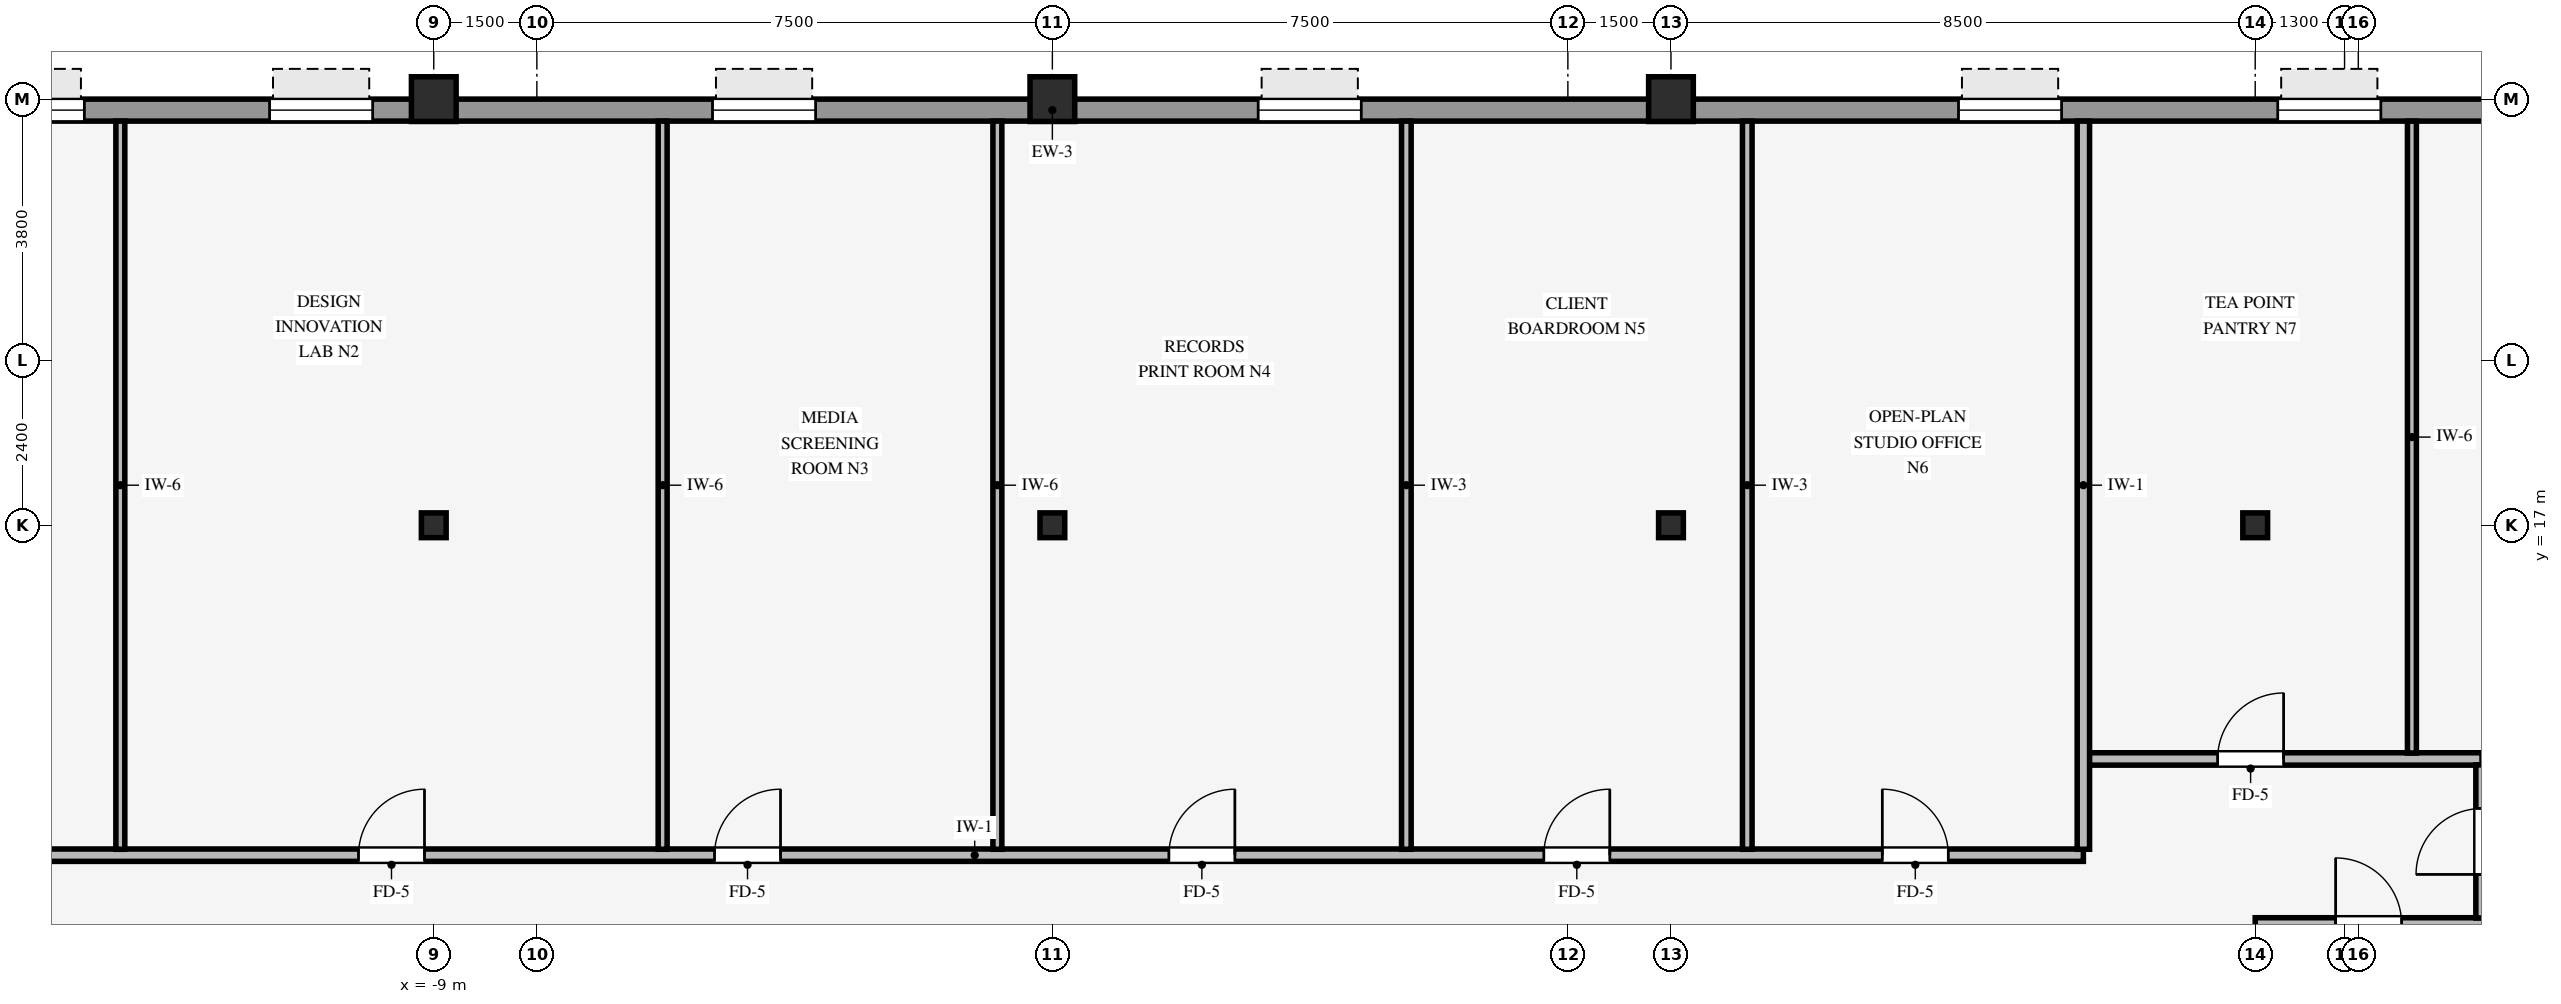
"""IFC4 building model, lengths in metres.
Left out: names, types, materials, properties, quantities, classifications, styles, units other than length and angle.
Written with IfcOpenShell. Run it as: python <this file> out.ifc"""

import sys

from ifc_helpers import new_model, si_unit, direction, frame, frame_2d, origin, origin_2d, place, context, subcontext, project, spatial, rectangle, hollow_rectangle, i_section, extrude, source, transform, mapped, element, fill, save


model = new_model("IFC4")
c1 = context("Model", 3, precision=1e-05, world=origin(), true_north=direction((0.0, 1.0)))
c2 = subcontext(c1, "Body", "Model", "MODEL_VIEW")
j1 = project(units=[si_unit("LENGTHUNIT", "METRE"), si_unit("PLANEANGLEUNIT", "RADIAN")], contexts=[c1])
p1 = place(None, origin())
s1 = spatial("IfcSite", under=j1, at=p1, CompositionType="ELEMENT")
p2 = place(p1, origin())
s2 = spatial("IfcBuilding", under=s1, at=p2, CompositionType="ELEMENT")
p3 = place(p2, frame((0.0, 0.0, 109.25)))
s3 = spatial("IfcBuildingStorey", under=s2, at=p3, CompositionType="ELEMENT", Elevation=109.25)
for number, where, z_axis, x_axis in (
    (1, (-9.0, 23.2, 0.0), (0.0, 0.0, 1.0), (1.0, 0.0, 0.0)),
    (2, (0.0, 23.2, 0.0), (0.0, 0.0, 1.0), (1.0, 0.0, 0.0)),
    (3, (9.0, 23.2, 0.0), (0.0, 0.0, 1.0), (1.0, 0.0, 0.0)),
):
    element("IfcColumn", number, at=place(p3, frame(where, z_axis=z_axis, x_axis=x_axis)), inside=s3, PredefinedType="COLUMN", context=c2, shape_type="SweptSolid", body=[
        extrude(hollow_rectangle(XDim=0.65, YDim=0.65, WallThickness=0.04, InnerFilletRadius=0.04, OuterFilletRadius=0.08, at=origin_2d()), origin(), (0.0, 0.0, 1.0), 3.37),
    ])
for number, where, z_axis, x_axis in (
    (4, (0.0, 17.0, 0.0), (0.0, 0.0, 1.0), (1.0, 0.0, 0.0)),
    (5, (-9.0, 17.0, 0.0), (0.0, 0.0, 1.0), (1.0, 0.0, 0.0)),
    (6, (9.0, 17.0, 0.0), (0.0, 0.0, 1.0), (1.0, 0.0, 0.0)),
    (7, (17.5, 17.0, 0.0), (0.0, 0.0, 1.0), (1.0, 0.0, 0.0)),
):
    element("IfcColumn", number, at=place(p3, frame(where, z_axis=z_axis, x_axis=x_axis)), inside=s3, PredefinedType="COLUMN", context=c2, shape_type="SweptSolid", body=[
        extrude(i_section(OverallWidth=0.36, OverallDepth=0.36, WebThickness=0.021, FlangeThickness=0.021, FilletRadius=0.018, at=origin_2d()), origin(), (0.0, 0.0, 1.0), 3.37),
    ])
p4 = place(p3, frame((-21.9, 23.04, 0.0), z_axis=(0.0, 0.0, 1.0), x_axis=(1.0, 0.0, 0.0)))
e8 = element("IfcWall", 8, at=p4, inside=s3, PredefinedType="STANDARD", context=c2, shape_type="SweptSolid", body=[
    extrude(rectangle(XDim=43.8, YDim=0.32, at=frame_2d((21.9, 0.0))), origin(), (0.0, 0.0, 1.0), 2.705),
])
p5 = place(p4, frame((2.572, 0.0, 0.8)))
e9 = element("IfcOpeningElement", 9, at=p5, cuts=e8, PredefinedType="OPENING", context=c2, shape_type="SweptSolid", body=[
    extrude(rectangle(XDim=1.5, YDim=1.6, at=frame_2d((0.75, 0.8))), frame((0.0, 0.17, 0.0), z_axis=(0.0, -1.0, 0.0), x_axis=(1.0, 0.0, 0.0)), (0.0, 0.0, 1.0), 0.34),
])
p6 = place(p4, frame((6.317, 0.0, 0.8)))
e10 = element("IfcOpeningElement", 10, at=p6, cuts=e8, PredefinedType="OPENING", context=c2, shape_type="SweptSolid", body=[
    extrude(rectangle(XDim=1.5, YDim=1.6, at=frame_2d((0.75, 0.8))), frame((0.0, 0.17, 0.0), z_axis=(0.0, -1.0, 0.0), x_axis=(1.0, 0.0, 0.0)), (0.0, 0.0, 1.0), 0.34),
])
p7 = place(p4, frame((10.511, 0.0, 0.8)))
e11 = element("IfcOpeningElement", 11, at=p7, cuts=e8, PredefinedType="OPENING", context=c2, shape_type="SweptSolid", body=[
    extrude(rectangle(XDim=1.5, YDim=1.6, at=frame_2d((0.75, 0.8))), frame((0.0, 0.17, 0.0), z_axis=(0.0, -1.0, 0.0), x_axis=(1.0, 0.0, 0.0)), (0.0, 0.0, 1.0), 0.34),
])
p8 = place(p4, frame((16.956, 0.0, 0.8)))
e12 = element("IfcOpeningElement", 12, at=p8, cuts=e8, PredefinedType="OPENING", context=c2, shape_type="SweptSolid", body=[
    extrude(rectangle(XDim=1.5, YDim=1.6, at=frame_2d((0.75, 0.8))), frame((0.0, 0.17, 0.0), z_axis=(0.0, -1.0, 0.0), x_axis=(1.0, 0.0, 0.0)), (0.0, 0.0, 1.0), 0.34),
])
p9 = place(p4, frame((24.894, 0.0, 0.8)))
e13 = element("IfcOpeningElement", 13, at=p9, cuts=e8, PredefinedType="OPENING", context=c2, shape_type="SweptSolid", body=[
    extrude(rectangle(XDim=1.5, YDim=1.6, at=frame_2d((0.75, 0.8))), frame((0.0, 0.17, 0.0), z_axis=(0.0, -1.0, 0.0), x_axis=(1.0, 0.0, 0.0)), (0.0, 0.0, 1.0), 0.34),
])
p10 = place(p4, frame((35.083, 0.0, 0.8)))
e14 = element("IfcOpeningElement", 14, at=p10, cuts=e8, PredefinedType="OPENING", context=c2, shape_type="SweptSolid", body=[
    extrude(rectangle(XDim=1.5, YDim=1.6, at=frame_2d((0.75, 0.8))), frame((0.0, 0.17, 0.0), z_axis=(0.0, -1.0, 0.0), x_axis=(1.0, 0.0, 0.0)), (0.0, 0.0, 1.0), 0.34),
])
p11 = place(p4, frame((39.728, 0.0, 0.8)))
e15 = element("IfcOpeningElement", 15, at=p11, cuts=e8, PredefinedType="OPENING", context=c2, shape_type="SweptSolid", body=[
    extrude(rectangle(XDim=1.5, YDim=1.6, at=frame_2d((0.75, 0.8))), frame((0.0, 0.17, 0.0), z_axis=(0.0, -1.0, 0.0), x_axis=(1.0, 0.0, 0.0)), (0.0, 0.0, 1.0), 0.34),
])
p12 = place(p3, frame((17.5, 11.2, 0.0), z_axis=(0.0, 0.0, 1.0), x_axis=(1.0, 0.0, 0.0)))
e16 = element("IfcWall", 16, at=p12, inside=s3, PredefinedType="PARTITIONING", context=c2, shape_type="SweptSolid", body=[
    extrude(rectangle(XDim=6.18, YDim=0.18, at=frame_2d((3.09, 0.0))), origin(), (0.0, 0.0, 1.0), 3.36),
])
p13 = place(p12, frame((1.17, 0.0, 0.0)))
e17 = element("IfcOpeningElement", 17, at=p13, cuts=e16, PredefinedType="OPENING", context=c2, shape_type="SweptSolid", body=[
    extrude(rectangle(XDim=0.96, YDim=2.1, at=frame_2d((0.48, 1.05))), frame((0.0, 0.1, 0.0), z_axis=(0.0, -1.0, 0.0), x_axis=(1.0, 0.0, 0.0)), (0.0, 0.0, 1.0), 0.2),
])
p14 = place(p3, frame((-15.0, 12.2, 0.0), z_axis=(0.0, 0.0, 1.0), x_axis=(1.0, 0.0, 0.0)))
e18 = element("IfcWall", 18, at=p14, inside=s3, PredefinedType="PARTITIONING", context=c2, shape_type="SweptSolid", body=[
    extrude(rectangle(XDim=30.0, YDim=0.18, at=frame_2d((15.0, 0.0))), origin(), (0.0, 0.0, 1.0), 3.36),
])
p15 = place(p14, frame((4.905, 0.0, 0.0)))
e19 = element("IfcOpeningElement", 19, at=p15, cuts=e18, PredefinedType="OPENING", context=c2, shape_type="SweptSolid", body=[
    extrude(rectangle(XDim=0.96, YDim=2.1, at=frame_2d((0.48, 1.05))), frame((0.0, 0.1, 0.0), z_axis=(0.0, -1.0, 0.0), x_axis=(1.0, 0.0, 0.0)), (0.0, 0.0, 1.0), 0.2),
])
p16 = place(p14, frame((16.695, 0.0, 0.0)))
e20 = element("IfcOpeningElement", 20, at=p16, cuts=e18, PredefinedType="OPENING", context=c2, shape_type="SweptSolid", body=[
    extrude(rectangle(XDim=0.96, YDim=2.1, at=frame_2d((0.48, 1.05))), frame((0.0, 0.1, 0.0), z_axis=(0.0, -1.0, 0.0), x_axis=(1.0, 0.0, 0.0)), (0.0, 0.0, 1.0), 0.2),
])
p17 = place(p14, frame((22.15, 0.0, 0.0)))
e21 = element("IfcOpeningElement", 21, at=p17, cuts=e18, PredefinedType="OPENING", context=c2, shape_type="SweptSolid", body=[
    extrude(rectangle(XDim=0.96, YDim=2.1, at=frame_2d((0.48, 1.05))), frame((0.0, 0.1, 0.0), z_axis=(0.0, -1.0, 0.0), x_axis=(1.0, 0.0, 0.0)), (0.0, 0.0, 1.0), 0.2),
])
p18 = place(p14, frame((27.075, 0.0, 0.0)))
e22 = element("IfcOpeningElement", 22, at=p18, cuts=e18, PredefinedType="OPENING", context=c2, shape_type="SweptSolid", body=[
    extrude(rectangle(XDim=0.96, YDim=2.1, at=frame_2d((0.48, 1.05))), frame((0.0, 0.1, 0.0), z_axis=(0.0, -1.0, 0.0), x_axis=(1.0, 0.0, 0.0)), (0.0, 0.0, 1.0), 0.2),
])
p19 = place(p14, frame((10.085, 0.0, 0.0)))
e23 = element("IfcOpeningElement", 23, at=p19, cuts=e18, PredefinedType="OPENING", context=c2, shape_type="SweptSolid", body=[
    extrude(rectangle(XDim=0.96, YDim=2.1, at=frame_2d((0.48, 1.05))), frame((0.0, 0.1, 0.0), z_axis=(0.0, -1.0, 0.0), x_axis=(1.0, 0.0, 0.0)), (0.0, 0.0, 1.0), 0.2),
])
p20 = place(p3, frame((15.086, 13.6, 0.0), z_axis=(0.0, 0.0, 1.0), x_axis=(1.0, 0.0, 0.0)))
e24 = element("IfcWall", 24, at=p20, inside=s3, PredefinedType="PARTITIONING", context=c2, shape_type="SweptSolid", body=[
    extrude(rectangle(XDim=5.714, YDim=0.18, at=frame_2d((2.857, 0.0))), origin(), (0.0, 0.0, 1.0), 2.998),
])
p21 = place(p20, frame((1.867, 0.0, 0.0)))
e25 = element("IfcOpeningElement", 25, at=p21, cuts=e24, PredefinedType="OPENING", context=c2, shape_type="SweptSolid", body=[
    extrude(rectangle(XDim=0.96, YDim=2.1, at=frame_2d((0.48, 1.05))), frame((0.0, 0.1, 0.0), z_axis=(0.0, -1.0, 0.0), x_axis=(1.0, 0.0, 0.0)), (0.0, 0.0, 1.0), 0.2),
])
for number, where, z_axis, x_axis in (
    (26, (-13.56, 12.286, 0.0), (0.0, 0.0, 1.0), (0.0, 1.0, 0.0)),
    (27, (-5.67, 12.286, 0.0), (0.0, 0.0, 1.0), (0.0, 1.0, 0.0)),
    (28, (-0.8, 12.286, 0.0), (0.0, 0.0, 1.0), (0.0, 1.0, 0.0)),
):
    element("IfcWall", number, at=place(p3, frame(where, z_axis=z_axis, x_axis=x_axis)), inside=s3, PredefinedType="PARTITIONING", context=c2, shape_type="SweptSolid", body=[
        extrude(rectangle(XDim=10.594, YDim=0.13, at=frame_2d((5.297, 0.0))), origin(), (0.0, 0.0, 1.0), 3.36),
    ])
for number, where, z_axis, x_axis in (
    (29, (5.15, 12.286, 0.0), (0.0, 0.0, 1.0), (0.0, 1.0, 0.0)),
    (30, (10.11, 12.286, 0.0), (0.0, 0.0, 1.0), (0.0, 1.0, 0.0)),
):
    element("IfcWall", number, at=place(p3, frame(where, z_axis=z_axis, x_axis=x_axis)), inside=s3, PredefinedType="PARTITIONING", context=c2, shape_type="SweptSolid", body=[
        extrude(rectangle(XDim=10.594, YDim=0.14, at=frame_2d((5.297, 0.0))), origin(), (0.0, 0.0, 1.0), 3.36),
    ])
p22 = place(p3, frame((15.0, 12.286, 0.0), z_axis=(0.0, 0.0, 1.0), x_axis=(0.0, 1.0, 0.0)))
e31 = element("IfcWall", 31, at=p22, inside=s3, PredefinedType="PARTITIONING", context=c2, shape_type="SweptSolid", body=[
    extrude(rectangle(XDim=10.594, YDim=0.18, at=frame_2d((5.297, 0.0))), origin(), (0.0, 0.0, 1.0), 3.36),
])
p23 = place(p3, frame((19.78, 13.686, 0.0), z_axis=(0.0, 0.0, 1.0), x_axis=(0.0, 1.0, 0.0)))
e32 = element("IfcWall", 32, at=p23, inside=s3, PredefinedType="PARTITIONING", context=c2, shape_type="SweptSolid", body=[
    extrude(rectangle(XDim=9.194, YDim=0.13, at=frame_2d((4.597, 0.0))), origin(), (0.0, 0.0, 1.0), 3.36),
])
p24 = place(p3, frame((20.8, 11.286, 0.0), z_axis=(0.0, 0.0, 1.0), x_axis=(0.0, 1.0, 0.0)))
e33 = element("IfcWall", 33, at=p24, inside=s3, PredefinedType="PARTITIONING", context=c2, shape_type="SweptSolid", body=[
    extrude(rectangle(XDim=2.228, YDim=0.18, at=frame_2d((1.114, 0.0))), origin(), (0.0, 0.0, 1.0), 3.36),
])
p25 = place(p24, frame((0.634, 0.0, 0.0)))
e34 = element("IfcOpeningElement", 34, at=p25, cuts=e33, PredefinedType="OPENING", context=c2, shape_type="SweptSolid", body=[
    extrude(rectangle(XDim=0.96, YDim=2.1, at=frame_2d((0.48, 1.05))), frame((0.0, 0.1, 0.0), z_axis=(0.0, -1.0, 0.0), x_axis=(1.0, 0.0, 0.0)), (0.0, 0.0, 1.0), 0.2),
])
m1 = source(origin(), c2, "Body", "SweptSolid", [
    extrude(rectangle(XDim=1.5, YDim=1.6, at=frame_2d((0.75, 0.8))), frame((0.0, 0.03, 0.0), z_axis=(0.0, -1.0, 0.0), x_axis=(1.0, 0.0, 0.0)), (0.0, 0.0, 1.0), 0.06),
])
p26 = place(p6, origin())
e35 = element("IfcWindow", 35, at=p26, inside=s3, PartitioningType="SINGLE_PANEL", PredefinedType="WINDOW", context=c2, shape_type="MappedRepresentation", body=[
    mapped(m1, transform((0.0, 0.0, 0.0), scale=1.0)),
])
fill(e10, e35)
p27 = place(p7, origin())
e36 = element("IfcWindow", 36, at=p27, inside=s3, PartitioningType="SINGLE_PANEL", PredefinedType="WINDOW", context=c2, shape_type="MappedRepresentation", body=[
    mapped(m1, transform((0.0, 0.0, 0.0), scale=1.0)),
])
fill(e11, e36)
p28 = place(p8, origin())
e37 = element("IfcWindow", 37, at=p28, inside=s3, PartitioningType="SINGLE_PANEL", PredefinedType="WINDOW", context=c2, shape_type="MappedRepresentation", body=[
    mapped(m1, transform((0.0, 0.0, 0.0), scale=1.0)),
])
fill(e12, e37)
p29 = place(p9, origin())
e38 = element("IfcWindow", 38, at=p29, inside=s3, PartitioningType="SINGLE_PANEL", PredefinedType="WINDOW", context=c2, shape_type="MappedRepresentation", body=[
    mapped(m1, transform((0.0, 0.0, 0.0), scale=1.0)),
])
fill(e13, e38)
p30 = place(p10, origin())
e39 = element("IfcWindow", 39, at=p30, inside=s3, PartitioningType="SINGLE_PANEL", PredefinedType="WINDOW", context=c2, shape_type="MappedRepresentation", body=[
    mapped(m1, transform((0.0, 0.0, 0.0), scale=1.0)),
])
fill(e14, e39)
p31 = place(p11, origin())
e40 = element("IfcWindow", 40, at=p31, inside=s3, PartitioningType="SINGLE_PANEL", PredefinedType="WINDOW", context=c2, shape_type="MappedRepresentation", body=[
    mapped(m1, transform((0.0, 0.0, 0.0), scale=1.0)),
])
fill(e15, e40)
m2 = source(origin(), c2, "Body", "SweptSolid", [
    extrude(rectangle(XDim=0.96, YDim=2.1, at=frame_2d((0.48, 1.05))), frame((0.0, 0.025, 0.0), z_axis=(0.0, -1.0, 0.0), x_axis=(1.0, 0.0, 0.0)), (0.0, 0.0, 1.0), 0.05),
])
p32 = place(p15, origin())
e41 = element("IfcDoor", 41, at=p32, inside=s3, OperationType="SINGLE_SWING_RIGHT", PredefinedType="DOOR", context=c2, shape_type="MappedRepresentation", body=[
    mapped(m2, transform((0.0, 0.0, 0.0), scale=1.0)),
])
fill(e19, e41)
p33 = place(p16, origin())
e42 = element("IfcDoor", 42, at=p33, inside=s3, OperationType="SINGLE_SWING_RIGHT", PredefinedType="DOOR", context=c2, shape_type="MappedRepresentation", body=[
    mapped(m2, transform((0.0, 0.0, 0.0), scale=1.0)),
])
fill(e20, e42)
p34 = place(p17, origin())
e43 = element("IfcDoor", 43, at=p34, inside=s3, OperationType="SINGLE_SWING_RIGHT", PredefinedType="DOOR", context=c2, shape_type="MappedRepresentation", body=[
    mapped(m2, transform((0.0, 0.0, 0.0), scale=1.0)),
])
fill(e21, e43)
p35 = place(p18, origin())
e44 = element("IfcDoor", 44, at=p35, inside=s3, OperationType="SINGLE_SWING_LEFT", PredefinedType="DOOR", context=c2, shape_type="MappedRepresentation", body=[
    mapped(m2, transform((0.0, 0.0, 0.0), scale=1.0)),
])
fill(e22, e44)
p36 = place(p21, origin())
e45 = element("IfcDoor", 45, at=p36, inside=s3, OperationType="SINGLE_SWING_RIGHT", PredefinedType="DOOR", context=c2, shape_type="MappedRepresentation", body=[
    mapped(m2, transform((0.0, 0.0, 0.0), scale=1.0)),
])
fill(e25, e45)
p37 = place(p13, origin())
e46 = element("IfcDoor", 46, at=p37, inside=s3, OperationType="SINGLE_SWING_LEFT", PredefinedType="DOOR", context=c2, shape_type="MappedRepresentation", body=[
    mapped(m2, transform((0.0, 0.0, 0.0), scale=1.0)),
])
fill(e17, e46)
p38 = place(p19, origin())
e47 = element("IfcDoor", 47, at=p38, inside=s3, OperationType="SINGLE_SWING_RIGHT", PredefinedType="DOOR", context=c2, shape_type="MappedRepresentation", body=[
    mapped(m2, transform((0.0, 0.0, 0.0), scale=1.0)),
])
fill(e23, e47)
p39 = place(p25, origin())
e48 = element("IfcDoor", 48, at=p39, inside=s3, OperationType="SINGLE_SWING_LEFT", PredefinedType="DOOR", context=c2, shape_type="MappedRepresentation", body=[
    mapped(m2, transform((0.0, 0.0, 0.0), scale=1.0)),
])
fill(e34, e48)
save(model, sys.argv[1])
